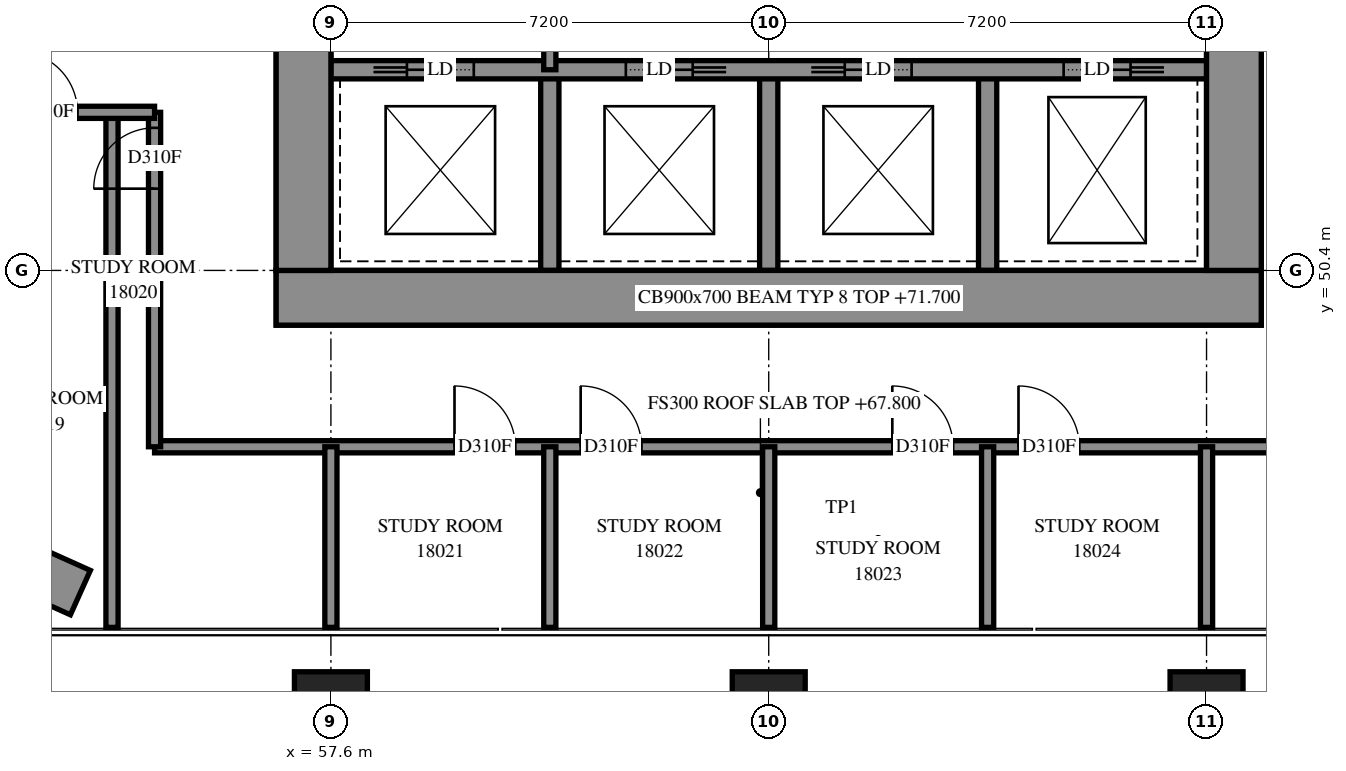
"""IFC4 building model, lengths in metres.
Left out: names, types, materials, properties, quantities, classifications, styles, units other than length and angle.
Written with IfcOpenShell. Run it as: python <this file> out.ifc"""

import sys

from ifc_helpers import new_model, si_unit, direction, frame, frame_2d, origin, origin_2d, place, context, subcontext, project, spatial, rectangle, extrude, element, fill, save


model = new_model("IFC4")
c1 = context("Model", 3, precision=1e-05, world=origin(), true_north=direction((0.0, 1.0)))
c2 = subcontext(c1, "Body", "Model", "MODEL_VIEW")
j1 = project(units=[si_unit("LENGTHUNIT", "METRE"), si_unit("PLANEANGLEUNIT", "RADIAN")], contexts=[c1])
p1 = place(None, origin())
s1 = spatial("IfcSite", under=j1, at=p1, CompositionType="ELEMENT")
p2 = place(p1, origin())
s2 = spatial("IfcBuilding", under=s1, at=p2, CompositionType="ELEMENT")
p3 = place(p2, frame((0.0, 0.0, 67.8)))
s3 = spatial("IfcBuildingStorey", under=s2, at=p3, CompositionType="ELEMENT", Elevation=67.8)
for number, where, z_axis, x_axis in (
    (1, (57.6, 43.2, 0.0), (0.0, 0.0, 1.0), (1.0, 0.0, 0.0)),
    (2, (64.8, 43.2, 0.0), (0.0, 0.0, 1.0), (1.0, 0.0, 0.0)),
    (3, (72.0, 43.2, 0.0), (0.0, 0.0, 1.0), (1.0, 0.0, 0.0)),
):
    element("IfcColumn", number, at=place(p3, frame(where, z_axis=z_axis, x_axis=x_axis)), inside=s3, PredefinedType="COLUMN", context=c2, shape_type="SweptSolid", body=[
        extrude(rectangle(XDim=1.2, YDim=1.2, at=origin_2d()), origin(), (0.0, 0.0, 1.0), 3.9),
    ])
p4 = place(p3, frame((56.7, 49.95, -0.3), z_axis=(0.0, 0.0, 1.0), x_axis=(1.0, 0.0, 0.0)))
e4 = element("IfcWall", 4, at=p4, inside=s3, PredefinedType="SHEAR", context=c2, shape_type="SweptSolid", body=[
    extrude(rectangle(XDim=16.2, YDim=0.9, at=frame_2d((8.1, 0.0))), origin(), (0.0, 0.0, 1.0), 3.5),
])
p5 = place(p3, frame((57.15, 50.4, -0.3), z_axis=(0.0, 0.0, 1.0), x_axis=(0.0, 1.0, 0.0)))
e5 = element("IfcWall", 5, at=p5, inside=s3, PredefinedType="SHEAR", context=c2, shape_type="SweptSolid", body=[
    extrude(rectangle(XDim=14.4, YDim=0.9, at=frame_2d((7.2, 0.0))), origin(), (0.0, 0.0, 1.0), 3.5),
])
p6 = place(p5, frame((4.55, 0.0, 0.3)))
e6 = element("IfcOpeningElement", 6, at=p6, cuts=e5, PredefinedType="OPENING", context=c2, shape_type="SweptSolid", body=[
    extrude(rectangle(XDim=1.1, YDim=2.1, at=frame_2d((0.55, 1.05))), frame((0.0, 0.46, 0.0), z_axis=(0.0, -1.0, 0.0), x_axis=(1.0, 0.0, 0.0)), (0.0, 0.0, 1.0), 0.92),
])
p7 = place(p5, frame((11.35, 0.0, 0.3)))
e7 = element("IfcOpeningElement", 7, at=p7, cuts=e5, PredefinedType="OPENING", context=c2, shape_type="SweptSolid", body=[
    extrude(rectangle(XDim=1.1, YDim=2.1, at=frame_2d((0.55, 1.05))), frame((0.0, 0.46, 0.0), z_axis=(0.0, -1.0, 0.0), x_axis=(1.0, 0.0, 0.0)), (0.0, 0.0, 1.0), 0.92),
])
p8 = place(p3, frame((72.45, 50.4, -0.3), z_axis=(0.0, 0.0, 1.0), x_axis=(0.0, 1.0, 0.0)))
e8 = element("IfcWall", 8, at=p8, inside=s3, PredefinedType="SHEAR", context=c2, shape_type="SweptSolid", body=[
    extrude(rectangle(XDim=14.4, YDim=0.9, at=frame_2d((7.2, 0.0))), origin(), (0.0, 0.0, 1.0), 3.5),
])
p9 = place(p8, frame((4.55, 0.0, 0.3)))
e9 = element("IfcOpeningElement", 9, at=p9, cuts=e8, PredefinedType="OPENING", context=c2, shape_type="SweptSolid", body=[
    extrude(rectangle(XDim=1.1, YDim=2.1, at=frame_2d((0.55, 1.05))), frame((0.0, 0.46, 0.0), z_axis=(0.0, -1.0, 0.0), x_axis=(1.0, 0.0, 0.0)), (0.0, 0.0, 1.0), 0.92),
])
p10 = place(p8, frame((11.35, 0.0, 0.3)))
e10 = element("IfcOpeningElement", 10, at=p10, cuts=e8, PredefinedType="OPENING", context=c2, shape_type="SweptSolid", body=[
    extrude(rectangle(XDim=1.1, YDim=2.1, at=frame_2d((0.55, 1.05))), frame((0.0, 0.46, 0.0), z_axis=(0.0, -1.0, 0.0), x_axis=(1.0, 0.0, 0.0)), (0.0, 0.0, 1.0), 0.92),
])
for number, where, z_axis, x_axis in (
    (11, (61.2, 50.4, 0.0), (0.0, 0.0, 1.0), (0.0, 1.0, 0.0)),
    (12, (64.8, 50.4, 0.0), (0.0, 0.0, 1.0), (0.0, 1.0, 0.0)),
    (13, (68.4, 50.4, 0.0), (0.0, 0.0, 1.0), (0.0, 1.0, 0.0)),
):
    element("IfcWall", number, at=place(p3, frame(where, z_axis=z_axis, x_axis=x_axis)), inside=s3, PredefinedType="SOLIDWALL", context=c2, shape_type="SweptSolid", body=[
        extrude(rectangle(XDim=3.3, YDim=0.3, at=frame_2d((1.65, 0.0))), origin(), (0.0, 0.0, 1.0), 3.9),
    ])
p11 = place(p3, frame((57.6, 53.7, 0.0), z_axis=(0.0, 0.0, 1.0), x_axis=(1.0, 0.0, 0.0)))
e14 = element("IfcWall", 14, at=p11, inside=s3, PredefinedType="SOLIDWALL", context=c2, shape_type="SweptSolid", body=[
    extrude(rectangle(XDim=14.4, YDim=0.3, at=frame_2d((7.2, 0.0))), origin(), (0.0, 0.0, 1.0), 3.9),
])
p12 = place(p11, frame((1.25, 0.0, 0.0)))
e15 = element("IfcOpeningElement", 15, at=p12, cuts=e14, PredefinedType="OPENING", context=c2, shape_type="SweptSolid", body=[
    extrude(rectangle(XDim=1.1, YDim=2.1, at=frame_2d((0.55, 1.05))), frame((0.0, 0.16, 0.0), z_axis=(0.0, -1.0, 0.0), x_axis=(1.0, 0.0, 0.0)), (0.0, 0.0, 1.0), 0.32),
])
p13 = place(p11, frame((4.85, 0.0, 0.0)))
e16 = element("IfcOpeningElement", 16, at=p13, cuts=e14, PredefinedType="OPENING", context=c2, shape_type="SweptSolid", body=[
    extrude(rectangle(XDim=1.1, YDim=2.1, at=frame_2d((0.55, 1.05))), frame((0.0, 0.16, 0.0), z_axis=(0.0, -1.0, 0.0), x_axis=(1.0, 0.0, 0.0)), (0.0, 0.0, 1.0), 0.32),
])
p14 = place(p11, frame((8.45, 0.0, 0.0)))
e17 = element("IfcOpeningElement", 17, at=p14, cuts=e14, PredefinedType="OPENING", context=c2, shape_type="SweptSolid", body=[
    extrude(rectangle(XDim=1.1, YDim=2.1, at=frame_2d((0.55, 1.05))), frame((0.0, 0.16, 0.0), z_axis=(0.0, -1.0, 0.0), x_axis=(1.0, 0.0, 0.0)), (0.0, 0.0, 1.0), 0.32),
])
p15 = place(p11, frame((12.05, 0.0, 0.0)))
e18 = element("IfcOpeningElement", 18, at=p15, cuts=e14, PredefinedType="OPENING", context=c2, shape_type="SweptSolid", body=[
    extrude(rectangle(XDim=1.1, YDim=2.1, at=frame_2d((0.55, 1.05))), frame((0.0, 0.16, 0.0), z_axis=(0.0, -1.0, 0.0), x_axis=(1.0, 0.0, 0.0)), (0.0, 0.0, 1.0), 0.32),
])
p16 = place(p3, frame((53.48, 45.102, 0.0), z_axis=(0.0, 0.0, 1.0), x_axis=(-0.9121191364, 0.4099252139, 0.0)))
e19 = element("IfcWall", 19, at=p16, inside=s3, PredefinedType="SOLIDWALL", context=c2, shape_type="SweptSolid", body=[
    extrude(rectangle(XDim=1.618, YDim=0.8, at=frame_2d((0.809, 0.0))), origin(), (0.0, 0.0, 1.0), 0.65),
])
p17 = place(p3, frame((61.2, 53.7, 0.0), z_axis=(0.0, 0.0, 1.0), x_axis=(0.0, 1.0, 0.0)))
e20 = element("IfcWall", 20, at=p17, inside=s3, PredefinedType="PARTITIONING", context=c2, shape_type="SweptSolid", body=[
    extrude(rectangle(XDim=3.6, YDim=0.2, at=frame_2d((1.8, 0.0))), origin(), (0.0, 0.0, 1.0), 3.9),
])
p18 = place(p3, frame((54.7, 47.5, 0.0), z_axis=(0.0, 0.0, 1.0), x_axis=(1.0, 0.0, 0.0)))
e21 = element("IfcWall", 21, at=p18, inside=s3, PredefinedType="PARTITIONING", context=c2, shape_type="SweptSolid", body=[
    extrude(rectangle(XDim=19.442, YDim=0.2, at=frame_2d((9.721, 0.0))), origin(), (0.0, 0.0, 1.0), 3.9),
])
p19 = place(p18, frame((4.933, 0.0, 0.0)))
e22 = element("IfcOpeningElement", 22, at=p19, cuts=e21, PredefinedType="OPENING", context=c2, shape_type="SweptSolid", body=[
    extrude(rectangle(XDim=1.0, YDim=2.1, at=frame_2d((0.5, 1.05))), frame((0.0, 0.11, 0.0), z_axis=(0.0, -1.0, 0.0), x_axis=(1.0, 0.0, 0.0)), (0.0, 0.0, 1.0), 0.22),
])
p20 = place(p18, frame((7.008, 0.0, 0.0)))
e23 = element("IfcOpeningElement", 23, at=p20, cuts=e21, PredefinedType="OPENING", context=c2, shape_type="SweptSolid", body=[
    extrude(rectangle(XDim=1.0, YDim=2.1, at=frame_2d((0.5, 1.05))), frame((0.0, 0.11, 0.0), z_axis=(0.0, -1.0, 0.0), x_axis=(1.0, 0.0, 0.0)), (0.0, 0.0, 1.0), 0.22),
])
p21 = place(p18, frame((12.133, 0.0, 0.0)))
e24 = element("IfcOpeningElement", 24, at=p21, cuts=e21, PredefinedType="OPENING", context=c2, shape_type="SweptSolid", body=[
    extrude(rectangle(XDim=1.0, YDim=2.1, at=frame_2d((0.5, 1.05))), frame((0.0, 0.11, 0.0), z_axis=(0.0, -1.0, 0.0), x_axis=(1.0, 0.0, 0.0)), (0.0, 0.0, 1.0), 0.22),
])
p22 = place(p18, frame((14.207, 0.0, 0.0)))
e25 = element("IfcOpeningElement", 25, at=p22, cuts=e21, PredefinedType="OPENING", context=c2, shape_type="SweptSolid", body=[
    extrude(rectangle(XDim=1.0, YDim=2.1, at=frame_2d((0.5, 1.05))), frame((0.0, 0.11, 0.0), z_axis=(0.0, -1.0, 0.0), x_axis=(1.0, 0.0, 0.0)), (0.0, 0.0, 1.0), 0.22),
])
p23 = place(p3, frame((54.0, 44.53, 0.0), z_axis=(0.0, 0.0, 1.0), x_axis=(0.0, 1.0, 0.0)))
e26 = element("IfcWall", 26, at=p23, inside=s3, PredefinedType="PARTITIONING", context=c2, shape_type="SweptSolid", body=[
    extrude(rectangle(XDim=8.47, YDim=0.2, at=frame_2d((4.235, 0.0))), origin(), (0.0, 0.0, 1.0), 3.9),
])
p24 = place(p3, frame((54.7, 47.5, 0.0), z_axis=(0.0, 0.0, 1.0), x_axis=(0.0, 1.0, 0.0)))
e27 = element("IfcWall", 27, at=p24, inside=s3, PredefinedType="PARTITIONING", context=c2, shape_type="SweptSolid", body=[
    extrude(rectangle(XDim=5.5, YDim=0.2, at=frame_2d((2.75, 0.0))), origin(), (0.0, 0.0, 1.0), 3.9),
])
p25 = place(p24, frame((4.245, 0.0, 0.0)))
e28 = element("IfcOpeningElement", 28, at=p25, cuts=e27, PredefinedType="OPENING", context=c2, shape_type="SweptSolid", body=[
    extrude(rectangle(XDim=1.0, YDim=2.1, at=frame_2d((0.5, 1.05))), frame((0.0, 0.11, 0.0), z_axis=(0.0, -1.0, 0.0), x_axis=(1.0, 0.0, 0.0)), (0.0, 0.0, 1.0), 0.22),
])
p26 = place(p3, frame((50.4, 53.0, 0.0), z_axis=(0.0, 0.0, 1.0), x_axis=(1.0, 0.0, 0.0)))
e29 = element("IfcWall", 29, at=p26, inside=s3, PredefinedType="PARTITIONING", context=c2, shape_type="SweptSolid", body=[
    extrude(rectangle(XDim=4.3, YDim=0.2, at=frame_2d((2.15, 0.0))), origin(), (0.0, 0.0, 1.0), 3.9),
])
p27 = place(p26, frame((2.033, 0.0, 0.0)))
e30 = element("IfcOpeningElement", 30, at=p27, cuts=e29, PredefinedType="OPENING", context=c2, shape_type="SweptSolid", body=[
    extrude(rectangle(XDim=1.0, YDim=2.1, at=frame_2d((0.5, 1.05))), frame((0.0, 0.11, 0.0), z_axis=(0.0, -1.0, 0.0), x_axis=(1.0, 0.0, 0.0)), (0.0, 0.0, 1.0), 0.22),
])
for number, where, z_axis, x_axis in (
    (31, (57.6, 44.53, 0.0), (0.0, 0.0, 1.0), (0.0, 1.0, 0.0)),
    (32, (61.2, 44.53, 0.0), (0.0, 0.0, 1.0), (0.0, 1.0, 0.0)),
    (33, (64.8, 44.53, 0.0), (0.0, 0.0, 1.0), (0.0, 1.0, 0.0)),
    (34, (68.4, 44.53, 0.0), (0.0, 0.0, 1.0), (0.0, 1.0, 0.0)),
    (35, (72.0, 44.53, 0.0), (0.0, 0.0, 1.0), (0.0, 1.0, 0.0)),
):
    element("IfcWall", number, at=place(p3, frame(where, z_axis=z_axis, x_axis=x_axis)), inside=s3, PredefinedType="PARTITIONING", context=c2, shape_type="SweptSolid", body=[
        extrude(rectangle(XDim=2.97, YDim=0.2, at=frame_2d((1.485, 0.0))), origin(), (0.0, 0.0, 1.0), 3.9),
    ])
p28 = place(p12, origin())
e36 = element("IfcDoor", 36, at=p28, inside=s3, OperationType="SLIDING_TO_LEFT", PredefinedType="DOOR", context=c2, shape_type="SweptSolid", body=[
    extrude(rectangle(XDim=1.1, YDim=2.1, at=frame_2d((0.55, 1.05))), frame((0.0, 0.025, 0.0), z_axis=(0.0, -1.0, 0.0), x_axis=(1.0, 0.0, 0.0)), (0.0, 0.0, 1.0), 0.05),
])
fill(e15, e36)
p29 = place(p13, origin())
e37 = element("IfcDoor", 37, at=p29, inside=s3, OperationType="SLIDING_TO_RIGHT", PredefinedType="DOOR", context=c2, shape_type="SweptSolid", body=[
    extrude(rectangle(XDim=1.1, YDim=2.1, at=frame_2d((0.55, 1.05))), frame((0.0, 0.025, 0.0), z_axis=(0.0, -1.0, 0.0), x_axis=(1.0, 0.0, 0.0)), (0.0, 0.0, 1.0), 0.05),
])
fill(e16, e37)
p30 = place(p14, origin())
e38 = element("IfcDoor", 38, at=p30, inside=s3, OperationType="SLIDING_TO_LEFT", PredefinedType="DOOR", context=c2, shape_type="SweptSolid", body=[
    extrude(rectangle(XDim=1.1, YDim=2.1, at=frame_2d((0.55, 1.05))), frame((0.0, 0.025, 0.0), z_axis=(0.0, -1.0, 0.0), x_axis=(1.0, 0.0, 0.0)), (0.0, 0.0, 1.0), 0.05),
])
fill(e17, e38)
p31 = place(p15, origin())
e39 = element("IfcDoor", 39, at=p31, inside=s3, OperationType="SLIDING_TO_RIGHT", PredefinedType="DOOR", context=c2, shape_type="SweptSolid", body=[
    extrude(rectangle(XDim=1.1, YDim=2.1, at=frame_2d((0.55, 1.05))), frame((0.0, 0.025, 0.0), z_axis=(0.0, -1.0, 0.0), x_axis=(1.0, 0.0, 0.0)), (0.0, 0.0, 1.0), 0.05),
])
fill(e18, e39)
p32 = place(p27, origin())
e40 = element("IfcDoor", 40, at=p32, inside=s3, OperationType="SINGLE_SWING_LEFT", PredefinedType="DOOR", context=c2, shape_type="SweptSolid", body=[
    extrude(rectangle(XDim=1.0, YDim=2.1, at=frame_2d((0.5, 1.05))), frame((0.0, 0.025, 0.0), z_axis=(0.0, -1.0, 0.0), x_axis=(1.0, 0.0, 0.0)), (0.0, 0.0, 1.0), 0.05),
])
fill(e30, e40)
p33 = place(p25, origin())
e41 = element("IfcDoor", 41, at=p33, inside=s3, OperationType="SINGLE_SWING_RIGHT", PredefinedType="DOOR", context=c2, shape_type="SweptSolid", body=[
    extrude(rectangle(XDim=1.0, YDim=2.1, at=frame_2d((0.5, 1.05))), frame((0.0, 0.025, 0.0), z_axis=(0.0, -1.0, 0.0), x_axis=(1.0, 0.0, 0.0)), (0.0, 0.0, 1.0), 0.05),
])
fill(e28, e41)
p34 = place(p19, origin())
e42 = element("IfcDoor", 42, at=p34, inside=s3, OperationType="SINGLE_SWING_LEFT", PredefinedType="DOOR", context=c2, shape_type="SweptSolid", body=[
    extrude(rectangle(XDim=1.0, YDim=2.1, at=frame_2d((0.5, 1.05))), frame((0.0, 0.025, 0.0), z_axis=(0.0, -1.0, 0.0), x_axis=(1.0, 0.0, 0.0)), (0.0, 0.0, 1.0), 0.05),
])
fill(e22, e42)
p35 = place(p20, origin())
e43 = element("IfcDoor", 43, at=p35, inside=s3, OperationType="SINGLE_SWING_RIGHT", PredefinedType="DOOR", context=c2, shape_type="SweptSolid", body=[
    extrude(rectangle(XDim=1.0, YDim=2.1, at=frame_2d((0.5, 1.05))), frame((0.0, 0.025, 0.0), z_axis=(0.0, -1.0, 0.0), x_axis=(1.0, 0.0, 0.0)), (0.0, 0.0, 1.0), 0.05),
])
fill(e23, e43)
p36 = place(p21, origin())
e44 = element("IfcDoor", 44, at=p36, inside=s3, OperationType="SINGLE_SWING_LEFT", PredefinedType="DOOR", context=c2, shape_type="SweptSolid", body=[
    extrude(rectangle(XDim=1.0, YDim=2.1, at=frame_2d((0.5, 1.05))), frame((0.0, 0.025, 0.0), z_axis=(0.0, -1.0, 0.0), x_axis=(1.0, 0.0, 0.0)), (0.0, 0.0, 1.0), 0.05),
])
fill(e24, e44)
p37 = place(p22, origin())
e45 = element("IfcDoor", 45, at=p37, inside=s3, OperationType="SINGLE_SWING_RIGHT", PredefinedType="DOOR", context=c2, shape_type="SweptSolid", body=[
    extrude(rectangle(XDim=1.0, YDim=2.1, at=frame_2d((0.5, 1.05))), frame((0.0, 0.025, 0.0), z_axis=(0.0, -1.0, 0.0), x_axis=(1.0, 0.0, 0.0)), (0.0, 0.0, 1.0), 0.05),
])
fill(e25, e45)
save(model, sys.argv[1])
